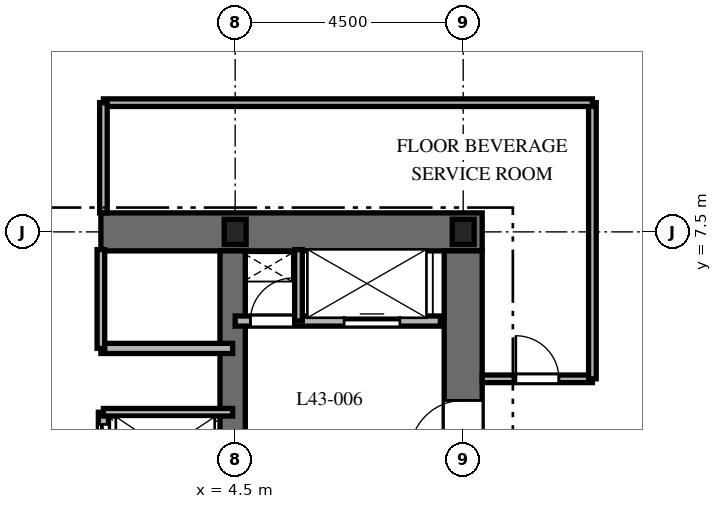
"""IFC4 building model, lengths in metres.
Left out: names, types, materials, properties, quantities, classifications, styles, units other than length and angle.
Written with IfcOpenShell. Run it as: python <this file> out.ifc"""

import sys

from ifc_helpers import new_model, si_unit, direction, frame, frame_2d, origin, origin_2d, place, context, subcontext, project, spatial, rectangle, i_section, extrude, element, fill, save


model = new_model("IFC4")
c1 = context("Model", 3, precision=1e-05, world=origin(), true_north=direction((0.0, 1.0)))
c2 = subcontext(c1, "Body", "Model", "MODEL_VIEW")
j1 = project(units=[si_unit("LENGTHUNIT", "METRE"), si_unit("PLANEANGLEUNIT", "RADIAN")], contexts=[c1])
p1 = place(None, origin())
s1 = spatial("IfcSite", under=j1, at=p1, CompositionType="ELEMENT")
p2 = place(p1, origin())
s2 = spatial("IfcBuilding", under=s1, at=p2, CompositionType="ELEMENT")
p3 = place(p2, frame((0.0, 0.0, 175.6)))
s3 = spatial("IfcBuildingStorey", under=s2, at=p3, CompositionType="ELEMENT", Elevation=175.6)
p4 = place(p3, frame((1.85, 7.5, 0.0), z_axis=(0.0, 0.0, 1.0), x_axis=(1.0, 0.0, 0.0)))
e1 = element("IfcWall", 1, at=p4, inside=s3, PredefinedType="SHEAR", context=c2, shape_type="SweptSolid", body=[
    extrude(rectangle(XDim=7.525, YDim=0.75, at=frame_2d((3.762, 0.0))), origin(), (0.0, 0.0, 1.0), 3.7),
])
p5 = place(p3, frame((9.0, -7.125, 0.0), z_axis=(0.0, 0.0, 1.0), x_axis=(0.0, 1.0, 0.0)))
e2 = element("IfcWall", 2, at=p5, inside=s3, PredefinedType="SHEAR", context=c2, shape_type="SweptSolid", body=[
    extrude(rectangle(XDim=14.25, YDim=0.75, at=frame_2d((7.125, 0.0))), origin(), (0.0, 0.0, 1.0), 3.7),
])
p6 = place(p5, frame((10.25, 0.0, 0.0)))
e3 = element("IfcOpeningElement", 3, at=p6, cuts=e2, PredefinedType="OPENING", context=c2, shape_type="SweptSolid", body=[
    extrude(rectangle(XDim=1.05, YDim=2.15, at=frame_2d((0.525, 1.075))), frame((0.0, 0.385, 0.0), z_axis=(0.0, -1.0, 0.0), x_axis=(1.0, 0.0, 0.0)), (0.0, 0.0, 1.0), 0.77),
])
p7 = place(p3, frame((4.45, 2.25, 0.0), z_axis=(0.0, 0.0, 1.0), x_axis=(0.0, 1.0, 0.0)))
e4 = element("IfcWall", 4, at=p7, inside=s3, PredefinedType="SHEAR", context=c2, shape_type="SweptSolid", body=[
    extrude(rectangle(XDim=4.875, YDim=0.5, at=frame_2d((2.438, 0.0))), origin(), (0.0, 0.0, 1.0), 3.7),
])
for number, where, z_axis, x_axis in (
    (5, (9.0, 7.5, 0.0), (0.0, 0.0, 1.0), (1.0, 0.0, 0.0)),
    (6, (4.5, 7.5, 0.0), (0.0, 0.0, 1.0), (1.0, 0.0, 0.0)),
):
    element("IfcColumn", number, at=place(p3, frame(where, z_axis=z_axis, x_axis=x_axis)), inside=s3, PredefinedType="COLUMN", context=c2, shape_type="SweptSolid", body=[
        extrude(i_section(OverallWidth=0.432, OverallDepth=0.498, WebThickness=0.056, FlangeThickness=0.089, at=origin_2d()), origin(), (0.0, 0.0, 1.0), 3.7),
    ])
p8 = place(p3, frame((4.5, 5.74, 0.0), z_axis=(0.0, 0.0, 1.0), x_axis=(1.0, 0.0, 0.0)))
e7 = element("IfcWall", 7, at=p8, inside=s3, PredefinedType="PARTITIONING", context=c2, shape_type="SweptSolid", body=[
    extrude(rectangle(XDim=4.05, YDim=0.2, at=frame_2d((2.025, 0.0))), origin(), (0.0, 0.0, 1.0), 3.4),
])
p9 = place(p8, frame((0.3, 0.0, 0.0)))
e8 = element("IfcOpeningElement", 8, at=p9, cuts=e7, PredefinedType="OPENING", context=c2, shape_type="SweptSolid", body=[
    extrude(rectangle(XDim=0.85, YDim=2.03, at=frame_2d((0.425, 1.015))), frame((0.0, 0.11, 0.0), z_axis=(0.0, -1.0, 0.0), x_axis=(1.0, 0.0, 0.0)), (0.0, 0.0, 1.0), 0.22),
])
p10 = place(p8, frame((2.15, 0.0, 0.0)))
e9 = element("IfcOpeningElement", 9, at=p10, cuts=e7, PredefinedType="OPENING", context=c2, shape_type="SweptSolid", body=[
    extrude(rectangle(XDim=1.1, YDim=2.2, at=frame_2d((0.55, 1.1))), frame((0.0, 0.11, 0.0), z_axis=(0.0, -1.0, 0.0), x_axis=(1.0, 0.0, 0.0)), (0.0, 0.0, 1.0), 0.22),
])
p11 = place(p3, frame((5.75, 5.74, 0.0), z_axis=(0.0, 0.0, 1.0), x_axis=(0.0, 1.0, 0.0)))
e10 = element("IfcWall", 10, at=p11, inside=s3, PredefinedType="PARTITIONING", context=c2, shape_type="SweptSolid", body=[
    extrude(rectangle(XDim=1.41, YDim=0.15, at=frame_2d((0.705, 0.0))), origin(), (0.0, 0.0, 1.0), 3.4),
])
p12 = place(p3, frame((1.85, 5.2, 0.0), z_axis=(0.0, 0.0, 1.0), x_axis=(1.0, 0.0, 0.0)))
e11 = element("IfcWall", 11, at=p12, inside=s3, PredefinedType="PARTITIONING", context=c2, shape_type="SweptSolid", body=[
    extrude(rectangle(XDim=2.6, YDim=0.2, at=frame_2d((1.3, 0.0))), origin(), (0.0, 0.0, 1.0), 3.4),
])
p13 = place(p3, frame((1.85, 5.2, 0.0), z_axis=(0.0, 0.0, 1.0), x_axis=(0.0, 1.0, 0.0)))
e12 = element("IfcWall", 12, at=p13, inside=s3, PredefinedType="PARTITIONING", context=c2, shape_type="SweptSolid", body=[
    extrude(rectangle(XDim=1.95, YDim=0.15, at=frame_2d((0.975, 0.0))), origin(), (0.0, 0.0, 1.0), 3.4),
])
p14 = place(p3, frame((1.9, -0.5, 0.0), z_axis=(0.0, 0.0, 1.0), x_axis=(0.0, 1.0, 0.0)))
e13 = element("IfcWall", 13, at=p14, inside=s3, PredefinedType="PARTITIONING", context=c2, shape_type="SweptSolid", body=[
    extrude(rectangle(XDim=4.44, YDim=0.2, at=frame_2d((2.22, 0.0))), origin(), (0.0, 0.0, 1.0), 3.4),
])
p15 = place(p14, frame((0.24, 0.0, 0.0)))
e14 = element("IfcOpeningElement", 14, at=p15, cuts=e13, PredefinedType="OPENING", context=c2, shape_type="SweptSolid", body=[
    extrude(rectangle(XDim=1.0, YDim=2.2, at=frame_2d((0.5, 1.1))), frame((0.0, 0.11, 0.0), z_axis=(0.0, -1.0, 0.0), x_axis=(1.0, 0.0, 0.0)), (0.0, 0.0, 1.0), 0.22),
])
p16 = place(p14, frame((1.72, 0.0, 0.0)))
e15 = element("IfcOpeningElement", 15, at=p16, cuts=e13, PredefinedType="OPENING", context=c2, shape_type="SweptSolid", body=[
    extrude(rectangle(XDim=1.0, YDim=2.2, at=frame_2d((0.5, 1.1))), frame((0.0, 0.11, 0.0), z_axis=(0.0, -1.0, 0.0), x_axis=(1.0, 0.0, 0.0)), (0.0, 0.0, 1.0), 0.22),
])
p17 = place(p14, frame((3.2, 0.0, 0.0)))
e16 = element("IfcOpeningElement", 16, at=p17, cuts=e13, PredefinedType="OPENING", context=c2, shape_type="SweptSolid", body=[
    extrude(rectangle(XDim=1.0, YDim=2.2, at=frame_2d((0.5, 1.1))), frame((0.0, 0.11, 0.0), z_axis=(0.0, -1.0, 0.0), x_axis=(1.0, 0.0, 0.0)), (0.0, 0.0, 1.0), 0.22),
])
p18 = place(p3, frame((1.9, 3.94, 0.0), z_axis=(0.0, 0.0, 1.0), x_axis=(1.0, 0.0, 0.0)))
e17 = element("IfcWall", 17, at=p18, inside=s3, PredefinedType="PARTITIONING", context=c2, shape_type="SweptSolid", body=[
    extrude(rectangle(XDim=2.55, YDim=0.15, at=frame_2d((1.275, 0.0))), origin(), (0.0, 0.0, 1.0), 3.4),
])
p19 = place(p3, frame((9.375, 4.6, 0.0), z_axis=(0.0, 0.0, 1.0), x_axis=(1.0, 0.0, 0.0)))
e18 = element("IfcWall", 18, at=p19, inside=s3, PredefinedType="PARTITIONING", context=c2, shape_type="SweptSolid", body=[
    extrude(rectangle(XDim=2.175, YDim=0.15, at=frame_2d((1.087, 0.0))), origin(), (0.0, 0.0, 1.0), 3.4),
])
p20 = place(p19, frame((0.663, 0.0, 0.0)))
e19 = element("IfcOpeningElement", 19, at=p20, cuts=e18, PredefinedType="OPENING", context=c2, shape_type="SweptSolid", body=[
    extrude(rectangle(XDim=0.85, YDim=2.03, at=frame_2d((0.425, 1.015))), frame((0.0, 0.085, 0.0), z_axis=(0.0, -1.0, 0.0), x_axis=(1.0, 0.0, 0.0)), (0.0, 0.0, 1.0), 0.17),
])
p21 = place(p3, frame((11.55, 4.6, 0.0), z_axis=(0.0, 0.0, 1.0), x_axis=(0.0, 1.0, 0.0)))
e20 = element("IfcWall", 20, at=p21, inside=s3, PredefinedType="PARTITIONING", context=c2, shape_type="SweptSolid", body=[
    extrude(rectangle(XDim=5.45, YDim=0.15, at=frame_2d((2.725, 0.0))), origin(), (0.0, 0.0, 1.0), 2.84),
])
p22 = place(p3, frame((11.55, 10.05, 0.0), z_axis=(0.0, 0.0, 1.0), x_axis=(-1.0, 0.0, 0.0)))
e21 = element("IfcWall", 21, at=p22, inside=s3, PredefinedType="PARTITIONING", context=c2, shape_type="SweptSolid", body=[
    extrude(rectangle(XDim=9.65, YDim=0.15, at=frame_2d((4.825, 0.0))), origin(), (0.0, 0.0, 1.0), 2.84),
])
p23 = place(p3, frame((1.9, 10.05, 0.0), z_axis=(0.0, 0.0, 1.0), x_axis=(0.0, -1.0, 0.0)))
e22 = element("IfcWall", 22, at=p23, inside=s3, PredefinedType="PARTITIONING", context=c2, shape_type="SweptSolid", body=[
    extrude(rectangle(XDim=2.175, YDim=0.15, at=frame_2d((1.087, 0.0))), origin(), (0.0, 0.0, 1.0), 3.4),
])
p24 = place(p6, origin())
e23 = element("IfcDoor", 23, at=p24, inside=s3, OperationType="SINGLE_SWING_LEFT", PredefinedType="DOOR", context=c2, shape_type="SweptSolid", body=[
    extrude(rectangle(XDim=1.05, YDim=2.15, at=frame_2d((0.525, 1.075))), frame((0.0, 0.025, 0.0), z_axis=(0.0, -1.0, 0.0), x_axis=(1.0, 0.0, 0.0)), (0.0, 0.0, 1.0), 0.05),
])
fill(e3, e23)
p25 = place(p9, origin())
e24 = element("IfcDoor", 24, at=p25, inside=s3, OperationType="SINGLE_SWING_RIGHT", PredefinedType="DOOR", context=c2, shape_type="SweptSolid", body=[
    extrude(rectangle(XDim=0.85, YDim=2.03, at=frame_2d((0.425, 1.015))), frame((0.0, 0.025, 0.0), z_axis=(0.0, -1.0, 0.0), x_axis=(1.0, 0.0, 0.0)), (0.0, 0.0, 1.0), 0.05),
])
fill(e8, e24)
p26 = place(p10, origin())
e25 = element("IfcDoor", 25, at=p26, inside=s3, OperationType="SLIDING_TO_RIGHT", PredefinedType="DOOR", context=c2, shape_type="SweptSolid", body=[
    extrude(rectangle(XDim=1.1, YDim=2.2, at=frame_2d((0.55, 1.1))), frame((0.0, 0.025, 0.0), z_axis=(0.0, -1.0, 0.0), x_axis=(1.0, 0.0, 0.0)), (0.0, 0.0, 1.0), 0.05),
])
fill(e9, e25)
p27 = place(p17, origin())
e26 = element("IfcDoor", 26, at=p27, inside=s3, OperationType="SLIDING_TO_RIGHT", PredefinedType="DOOR", context=c2, shape_type="SweptSolid", body=[
    extrude(rectangle(XDim=1.0, YDim=2.2, at=frame_2d((0.5, 1.1))), frame((0.0, 0.025, 0.0), z_axis=(0.0, -1.0, 0.0), x_axis=(1.0, 0.0, 0.0)), (0.0, 0.0, 1.0), 0.05),
])
fill(e16, e26)
p28 = place(p20, origin())
e27 = element("IfcDoor", 27, at=p28, inside=s3, OperationType="SINGLE_SWING_LEFT", PredefinedType="DOOR", context=c2, shape_type="SweptSolid", body=[
    extrude(rectangle(XDim=0.85, YDim=2.03, at=frame_2d((0.425, 1.015))), frame((0.0, 0.025, 0.0), z_axis=(0.0, -1.0, 0.0), x_axis=(1.0, 0.0, 0.0)), (0.0, 0.0, 1.0), 0.05),
])
fill(e19, e27)
save(model, sys.argv[1])
